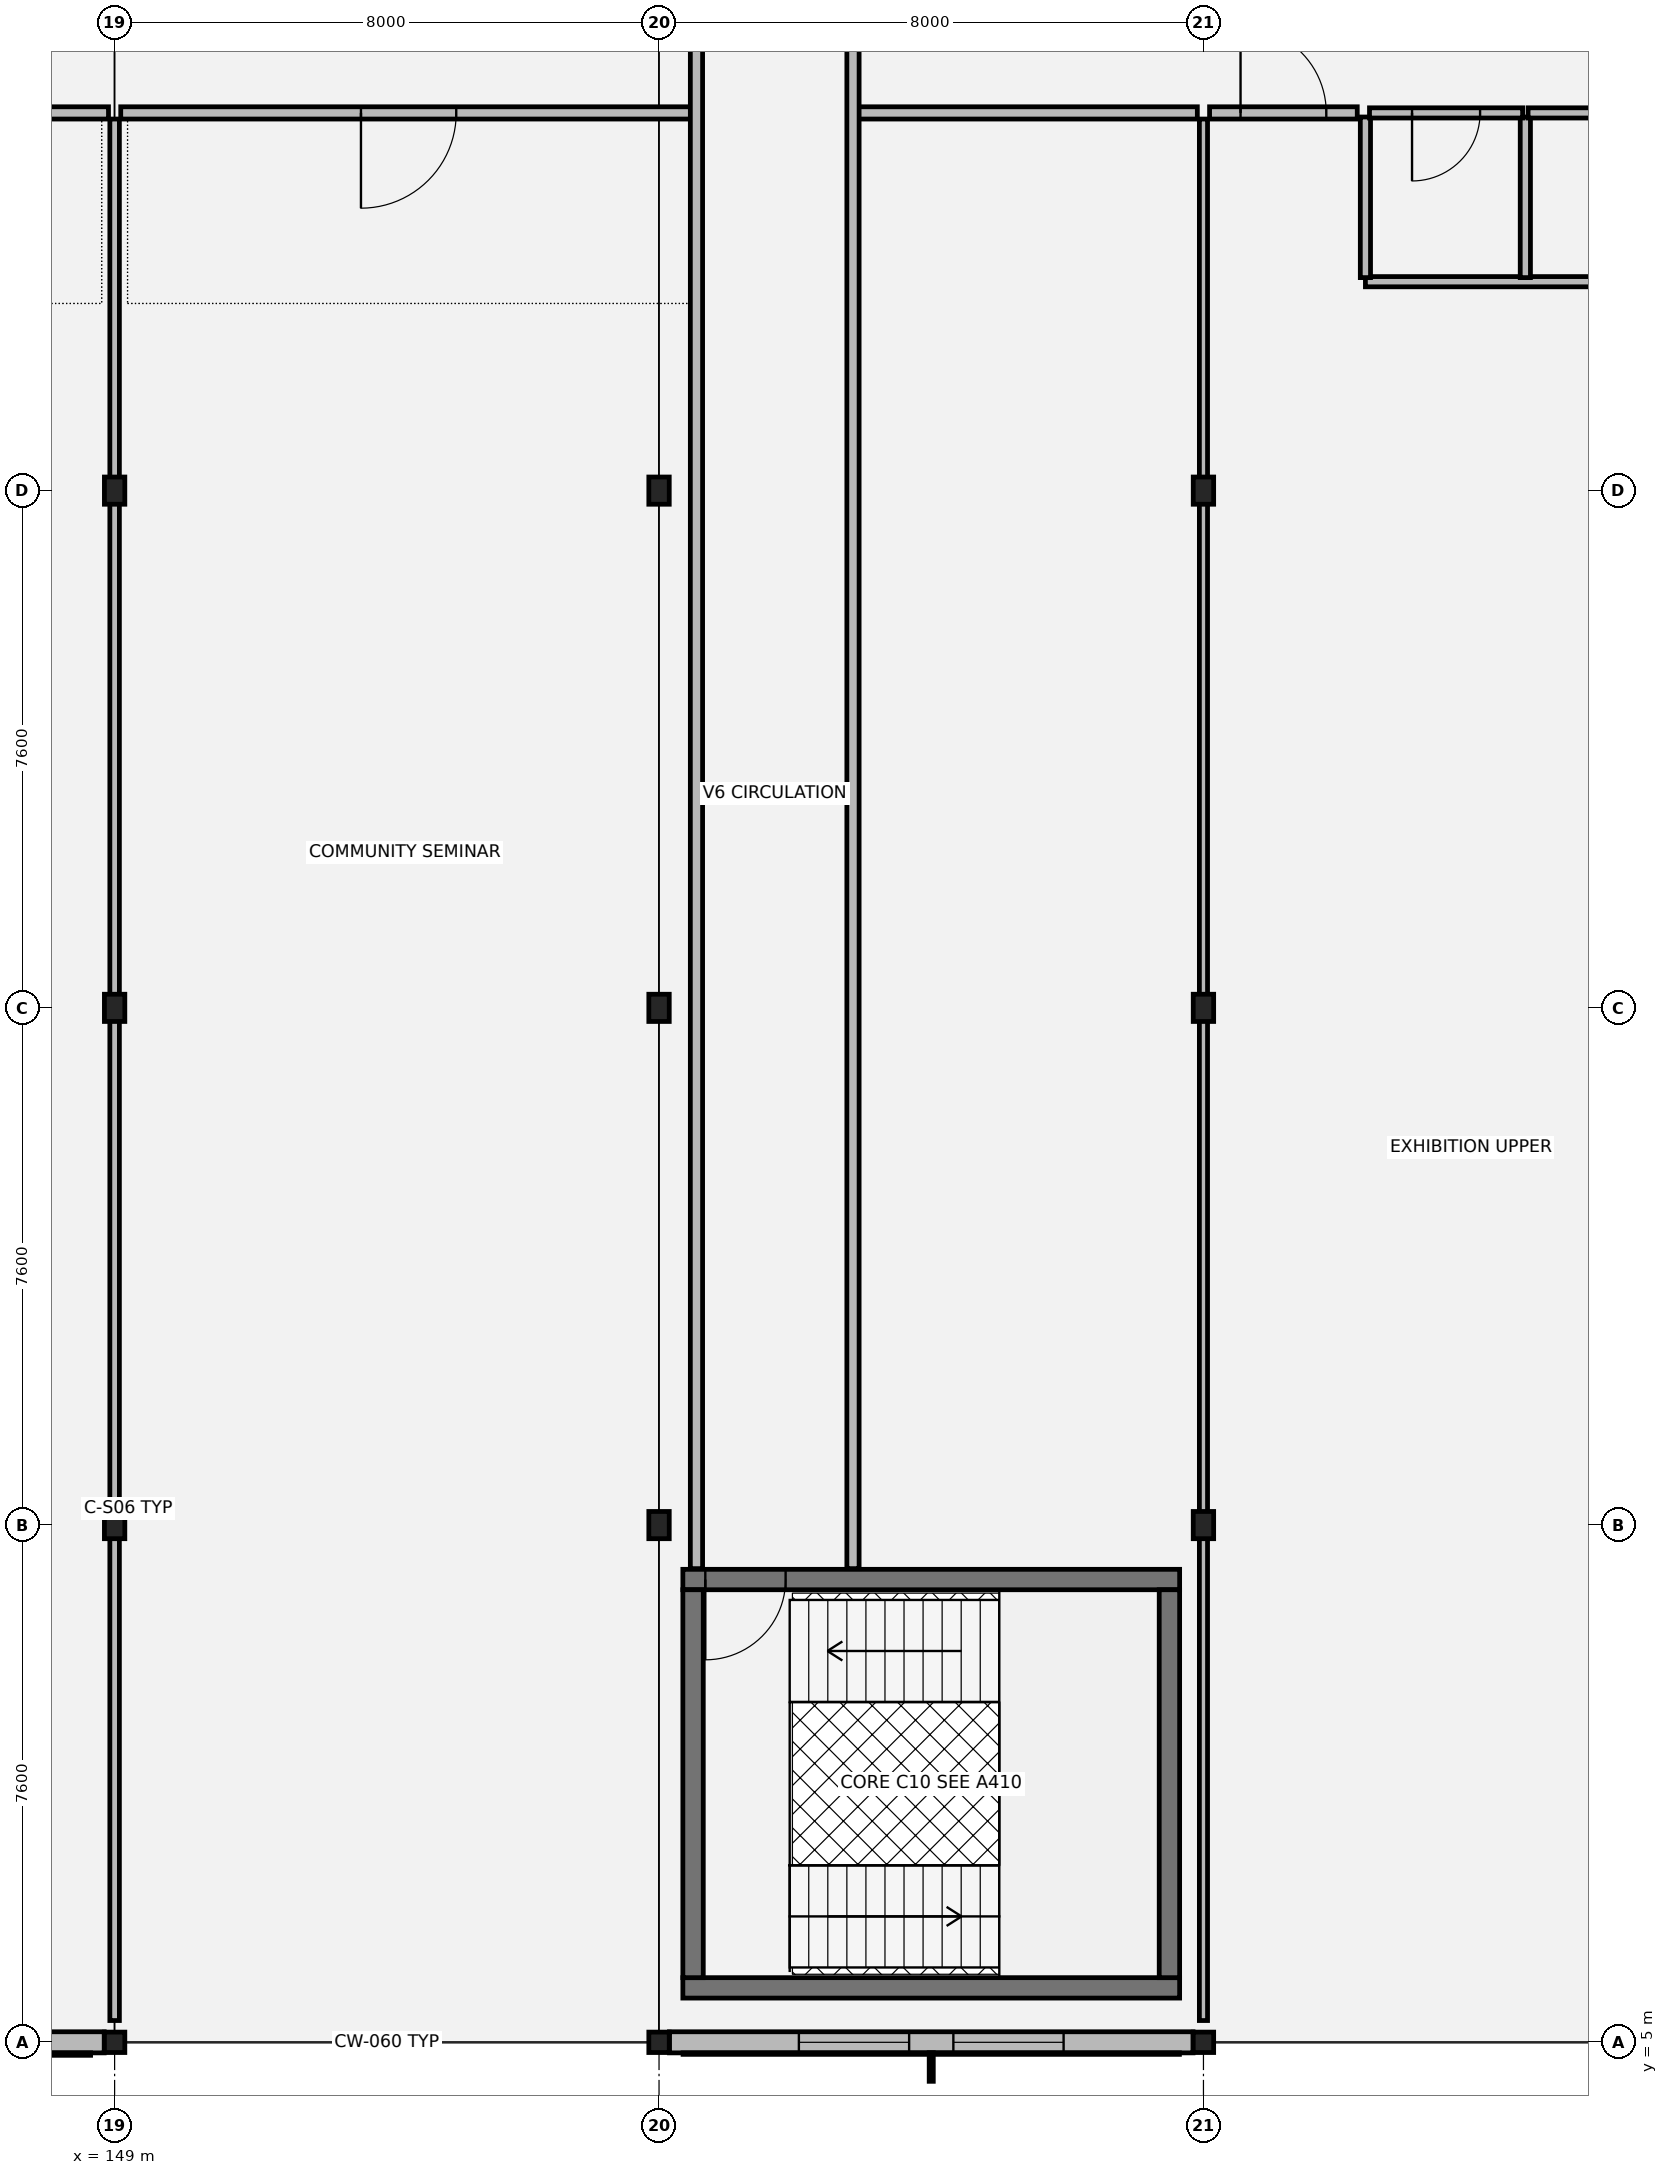
"""IFC4 building model, lengths in metres.
Left out: names, types, materials, properties, quantities, classifications, styles, units other than length and angle.
Written with IfcOpenShell. Run it as: python <this file> out.ifc"""

import sys

from ifc_helpers import new_model, si_unit, direction, frame, frame_2d, origin, origin_2d, place, context, subcontext, project, spatial, rectangle, hollow_rectangle, i_section, extrude, element, fill, save


model = new_model("IFC4")
c1 = context("Model", 3, precision=1e-05, world=origin(), true_north=direction((0.0, 1.0)))
c2 = subcontext(c1, "Body", "Model", "MODEL_VIEW")
j1 = project(units=[si_unit("LENGTHUNIT", "METRE"), si_unit("PLANEANGLEUNIT", "RADIAN")], contexts=[c1])
p1 = place(None, origin())
s1 = spatial("IfcSite", under=j1, at=p1, CompositionType="ELEMENT")
p2 = place(p1, origin())
s2 = spatial("IfcBuilding", under=s1, at=p2, CompositionType="ELEMENT")
p3 = place(p2, frame((0.0, 0.0, 5.1)))
s3 = spatial("IfcBuildingStorey", under=s2, at=p3, CompositionType="ELEMENT", Elevation=5.1)
p4 = place(p3, frame((149.0, 5.0, 0.0), z_axis=(0.0, 0.0, 1.0), x_axis=(1.0, 0.0, 0.0)))
e1 = element("IfcColumn", 1, at=p4, inside=s3, PredefinedType="COLUMN", context=c2, shape_type="SweptSolid", body=[
    extrude(hollow_rectangle(XDim=0.3, YDim=0.3, WallThickness=0.012, at=origin_2d()), origin(), (0.0, 0.0, 1.0), 4.055),
])
for number, where, z_axis, x_axis in (
    (2, (149.0, 12.6, 0.0), (0.0, 0.0, 1.0), (1.0, 0.0, 0.0)),
    (3, (149.0, 20.2, 0.0), (0.0, 0.0, 1.0), (1.0, 0.0, 0.0)),
    (4, (149.0, 27.8, 0.0), (0.0, 0.0, 1.0), (1.0, 0.0, 0.0)),
):
    element("IfcColumn", number, at=place(p3, frame(where, z_axis=z_axis, x_axis=x_axis)), inside=s3, PredefinedType="COLUMN", context=c2, shape_type="SweptSolid", body=[
        extrude(i_section(OverallWidth=0.3, OverallDepth=0.4, WebThickness=0.013, FlangeThickness=0.024, at=origin_2d()), origin(), (0.0, 0.0, 1.0), 4.055),
    ])
p5 = place(p3, frame((157.0, 5.0, 0.0), z_axis=(0.0, 0.0, 1.0), x_axis=(1.0, 0.0, 0.0)))
e5 = element("IfcColumn", 5, at=p5, inside=s3, PredefinedType="COLUMN", context=c2, shape_type="SweptSolid", body=[
    extrude(hollow_rectangle(XDim=0.3, YDim=0.3, WallThickness=0.012, at=origin_2d()), origin(), (0.0, 0.0, 1.0), 4.055),
])
for number, where, z_axis, x_axis in (
    (6, (157.0, 12.6, 0.0), (0.0, 0.0, 1.0), (1.0, 0.0, 0.0)),
    (7, (157.0, 20.2, 0.0), (0.0, 0.0, 1.0), (1.0, 0.0, 0.0)),
    (8, (157.0, 27.8, 0.0), (0.0, 0.0, 1.0), (1.0, 0.0, 0.0)),
):
    element("IfcColumn", number, at=place(p3, frame(where, z_axis=z_axis, x_axis=x_axis)), inside=s3, PredefinedType="COLUMN", context=c2, shape_type="SweptSolid", body=[
        extrude(i_section(OverallWidth=0.3, OverallDepth=0.4, WebThickness=0.013, FlangeThickness=0.024, at=origin_2d()), origin(), (0.0, 0.0, 1.0), 4.055),
    ])
p6 = place(p3, frame((165.0, 5.0, 0.0), z_axis=(0.0, 0.0, 1.0), x_axis=(1.0, 0.0, 0.0)))
e9 = element("IfcColumn", 9, at=p6, inside=s3, PredefinedType="COLUMN", context=c2, shape_type="SweptSolid", body=[
    extrude(hollow_rectangle(XDim=0.3, YDim=0.3, WallThickness=0.012, at=origin_2d()), origin(), (0.0, 0.0, 1.0), 4.055),
])
for number, where, z_axis, x_axis in (
    (10, (165.0, 12.6, 0.0), (0.0, 0.0, 1.0), (1.0, 0.0, 0.0)),
    (11, (165.0, 20.2, 0.0), (0.0, 0.0, 1.0), (1.0, 0.0, 0.0)),
    (12, (165.0, 27.8, 0.0), (0.0, 0.0, 1.0), (1.0, 0.0, 0.0)),
):
    element("IfcColumn", number, at=place(p3, frame(where, z_axis=z_axis, x_axis=x_axis)), inside=s3, PredefinedType="COLUMN", context=c2, shape_type="SweptSolid", body=[
        extrude(i_section(OverallWidth=0.3, OverallDepth=0.4, WebThickness=0.013, FlangeThickness=0.024, at=origin_2d()), origin(), (0.0, 0.0, 1.0), 4.055),
    ])
p7 = place(p3, frame((141.153, 5.0, 0.0), z_axis=(0.0, 0.0, 1.0), x_axis=(1.0, 0.0, 0.0)))
e13 = element("IfcWall", 13, at=p7, inside=s3, PredefinedType="SOLIDWALL", context=c2, shape_type="SweptSolid", body=[
    extrude(rectangle(XDim=7.694, YDim=0.31, at=frame_2d((3.847, 0.0))), origin(), (0.0, 0.0, 1.0), 3.48),
])
p8 = place(p7, frame((1.422, 0.0, 0.8)))
e14 = element("IfcOpeningElement", 14, at=p8, cuts=e13, PredefinedType="OPENING", context=c2, shape_type="SweptSolid", body=[
    extrude(rectangle(XDim=2.1, YDim=2.25, at=frame_2d((1.05, 1.125))), frame((0.0, 0.165, 0.0), z_axis=(0.0, -1.0, 0.0), x_axis=(1.0, 0.0, 0.0)), (0.0, 0.0, 1.0), 0.33),
])
p9 = place(p7, frame((4.172, 0.0, 0.8)))
e15 = element("IfcOpeningElement", 15, at=p9, cuts=e13, PredefinedType="OPENING", context=c2, shape_type="SweptSolid", body=[
    extrude(rectangle(XDim=2.1, YDim=2.25, at=frame_2d((1.05, 1.125))), frame((0.0, 0.165, 0.0), z_axis=(0.0, -1.0, 0.0), x_axis=(1.0, 0.0, 0.0)), (0.0, 0.0, 1.0), 0.33),
])
p10 = place(p3, frame((157.153, 5.0, 0.0), z_axis=(0.0, 0.0, 1.0), x_axis=(1.0, 0.0, 0.0)))
e16 = element("IfcWall", 16, at=p10, inside=s3, PredefinedType="SOLIDWALL", context=c2, shape_type="SweptSolid", body=[
    extrude(rectangle(XDim=7.694, YDim=0.31, at=frame_2d((3.847, 0.0))), origin(), (0.0, 0.0, 1.0), 3.48),
])
p11 = place(p10, frame((1.902, 0.0, 0.8)))
e17 = element("IfcOpeningElement", 17, at=p11, cuts=e16, PredefinedType="OPENING", context=c2, shape_type="SweptSolid", body=[
    extrude(rectangle(XDim=1.62, YDim=2.06, at=frame_2d((0.81, 1.03))), frame((0.0, 0.165, 0.0), z_axis=(0.0, -1.0, 0.0), x_axis=(1.0, 0.0, 0.0)), (0.0, 0.0, 1.0), 0.33),
])
p12 = place(p10, frame((4.172, 0.0, 0.8)))
e18 = element("IfcOpeningElement", 18, at=p12, cuts=e16, PredefinedType="OPENING", context=c2, shape_type="SweptSolid", body=[
    extrude(rectangle(XDim=1.62, YDim=2.06, at=frame_2d((0.81, 1.03))), frame((0.0, 0.165, 0.0), z_axis=(0.0, -1.0, 0.0), x_axis=(1.0, 0.0, 0.0)), (0.0, 0.0, 1.0), 0.33),
])
p13 = place(p3, frame((157.35, 5.8, 0.0), z_axis=(0.0, 0.0, 1.0), x_axis=(1.0, 0.0, 0.0)))
e19 = element("IfcWall", 19, at=p13, inside=s3, PredefinedType="SHEAR", context=c2, shape_type="SweptSolid", body=[
    extrude(rectangle(XDim=7.3, YDim=0.3, at=frame_2d((3.65, 0.0))), origin(), (0.0, 0.0, 1.0), 3.845),
])
p14 = place(p3, frame((157.35, 11.8, 0.0), z_axis=(0.0, 0.0, 1.0), x_axis=(1.0, 0.0, 0.0)))
e20 = element("IfcWall", 20, at=p14, inside=s3, PredefinedType="SHEAR", context=c2, shape_type="SweptSolid", body=[
    extrude(rectangle(XDim=7.3, YDim=0.3, at=frame_2d((3.65, 0.0))), origin(), (0.0, 0.0, 1.0), 3.845),
])
p15 = place(p14, frame((0.33, 0.0, 0.0)))
e21 = element("IfcOpeningElement", 21, at=p15, cuts=e20, PredefinedType="OPENING", context=c2, shape_type="SweptSolid", body=[
    extrude(rectangle(XDim=1.18, YDim=2.18, at=frame_2d((0.59, 1.09))), frame((0.0, 0.16, 0.0), z_axis=(0.0, -1.0, 0.0), x_axis=(1.0, 0.0, 0.0)), (0.0, 0.0, 1.0), 0.32),
])
for number, where, z_axis, x_axis in (
    (22, (157.5, 5.95, 0.0), (0.0, 0.0, 1.0), (0.0, 1.0, 0.0)),
    (23, (164.5, 5.95, 0.0), (0.0, 0.0, 1.0), (0.0, 1.0, 0.0)),
):
    element("IfcWall", number, at=place(p3, frame(where, z_axis=z_axis, x_axis=x_axis)), inside=s3, PredefinedType="SHEAR", context=c2, shape_type="SweptSolid", body=[
        extrude(rectangle(XDim=5.7, YDim=0.3, at=frame_2d((2.85, 0.0))), origin(), (0.0, 0.0, 1.0), 3.845),
    ])
p16 = place(p3, frame((167.38, 30.87, 0.0), z_axis=(0.0, 0.0, 1.0), x_axis=(1.0, 0.0, 0.0)))
e24 = element("IfcWall", 24, at=p16, inside=s3, PredefinedType="PARTITIONING", context=c2, shape_type="SweptSolid", body=[
    extrude(rectangle(XDim=5.42, YDim=0.15, at=frame_2d((2.71, 0.0))), origin(), (0.0, 0.0, 1.0), 3.18),
])
for number, where, z_axis, x_axis in (
    (25, (167.38, 30.93, 0.0), (0.0, 0.0, 1.0), (0.0, 1.0, 0.0)),
    (26, (169.73, 30.93, 0.0), (0.0, 0.0, 1.0), (0.0, 1.0, 0.0)),
):
    element("IfcWall", number, at=place(p3, frame(where, z_axis=z_axis, x_axis=x_axis)), inside=s3, PredefinedType="PARTITIONING", context=c2, shape_type="SweptSolid", body=[
        extrude(rectangle(XDim=2.36, YDim=0.15, at=frame_2d((1.18, 0.0))), origin(), (0.0, 0.0, 1.0), 3.18),
    ])
p17 = place(p3, frame((167.44, 33.35, 0.0), z_axis=(0.0, 0.0, 1.0), x_axis=(1.0, 0.0, 0.0)))
e27 = element("IfcWall", 27, at=p17, inside=s3, PredefinedType="PARTITIONING", context=c2, shape_type="SweptSolid", body=[
    extrude(rectangle(XDim=2.25, YDim=0.15, at=frame_2d((1.125, 0.0))), origin(), (0.0, 0.0, 1.0), 3.18),
])
p18 = place(p17, frame((0.625, 0.0, 0.0)))
e28 = element("IfcOpeningElement", 28, at=p18, cuts=e27, PredefinedType="OPENING", context=c2, shape_type="SweptSolid", body=[
    extrude(rectangle(XDim=1.0, YDim=2.15, at=frame_2d((0.5, 1.075))), frame((0.0, 0.085, 0.0), z_axis=(0.0, -1.0, 0.0), x_axis=(1.0, 0.0, 0.0)), (0.0, 0.0, 1.0), 0.17),
])
p19 = place(p3, frame((169.77, 33.35, 0.0), z_axis=(0.0, 0.0, 1.0), x_axis=(1.0, 0.0, 0.0)))
e29 = element("IfcWall", 29, at=p19, inside=s3, PredefinedType="PARTITIONING", context=c2, shape_type="SweptSolid", body=[
    extrude(rectangle(XDim=3.03, YDim=0.15, at=frame_2d((1.515, 0.0))), origin(), (0.0, 0.0, 1.0), 3.18),
])
p20 = place(p19, frame((1.78, 0.0, 0.0)))
e30 = element("IfcOpeningElement", 30, at=p20, cuts=e29, PredefinedType="OPENING", context=c2, shape_type="SweptSolid", body=[
    extrude(rectangle(XDim=0.9, YDim=2.15, at=frame_2d((0.45, 1.075))), frame((0.0, 0.085, 0.0), z_axis=(0.0, -1.0, 0.0), x_axis=(1.0, 0.0, 0.0)), (0.0, 0.0, 1.0), 0.17),
])
p21 = place(p3, frame((141.2, 33.35, 0.0), z_axis=(0.0, 0.0, 1.0), x_axis=(1.0, 0.0, 0.0)))
e31 = element("IfcWall", 31, at=p21, inside=s3, PredefinedType="PARTITIONING", context=c2, shape_type="SweptSolid", body=[
    extrude(rectangle(XDim=7.71, YDim=0.18, at=frame_2d((3.855, 0.0))), origin(), (0.0, 0.0, 1.0), 3.18),
])
p22 = place(p21, frame((2.955, 0.0, 0.0)))
e32 = element("IfcOpeningElement", 32, at=p22, cuts=e31, PredefinedType="OPENING", context=c2, shape_type="SweptSolid", body=[
    extrude(rectangle(XDim=1.8, YDim=2.3, at=frame_2d((0.9, 1.15))), frame((0.0, 0.1, 0.0), z_axis=(0.0, -1.0, 0.0), x_axis=(1.0, 0.0, 0.0)), (0.0, 0.0, 1.0), 0.2),
])
p23 = place(p3, frame((149.09, 33.35, 0.0), z_axis=(0.0, 0.0, 1.0), x_axis=(1.0, 0.0, 0.0)))
e33 = element("IfcWall", 33, at=p23, inside=s3, PredefinedType="PARTITIONING", context=c2, shape_type="SweptSolid", body=[
    extrude(rectangle(XDim=8.46, YDim=0.18, at=frame_2d((4.23, 0.0))), origin(), (0.0, 0.0, 1.0), 3.18),
])
p24 = place(p23, frame((3.53, 0.0, 0.0)))
e34 = element("IfcOpeningElement", 34, at=p24, cuts=e33, PredefinedType="OPENING", context=c2, shape_type="SweptSolid", body=[
    extrude(rectangle(XDim=1.4, YDim=2.22, at=frame_2d((0.7, 1.11))), frame((0.0, 0.1, 0.0), z_axis=(0.0, -1.0, 0.0), x_axis=(1.0, 0.0, 0.0)), (0.0, 0.0, 1.0), 0.2),
])
p25 = place(p3, frame((159.85, 33.35, 0.0), z_axis=(0.0, 0.0, 1.0), x_axis=(1.0, 0.0, 0.0)))
e35 = element("IfcWall", 35, at=p25, inside=s3, PredefinedType="PARTITIONING", context=c2, shape_type="SweptSolid", body=[
    extrude(rectangle(XDim=5.06, YDim=0.18, at=frame_2d((2.53, 0.0))), origin(), (0.0, 0.0, 1.0), 3.18),
])
p26 = place(p3, frame((165.09, 33.35, 0.0), z_axis=(0.0, 0.0, 1.0), x_axis=(1.0, 0.0, 0.0)))
e36 = element("IfcWall", 36, at=p26, inside=s3, PredefinedType="PARTITIONING", context=c2, shape_type="SweptSolid", body=[
    extrude(rectangle(XDim=2.17, YDim=0.18, at=frame_2d((1.085, 0.0))), origin(), (0.0, 0.0, 1.0), 3.18),
])
p27 = place(p26, frame((0.455, 0.0, 0.0)))
e37 = element("IfcOpeningElement", 37, at=p27, cuts=e36, PredefinedType="OPENING", context=c2, shape_type="SweptSolid", body=[
    extrude(rectangle(XDim=1.26, YDim=2.2, at=frame_2d((0.63, 1.1))), frame((0.0, 0.1, 0.0), z_axis=(0.0, -1.0, 0.0), x_axis=(1.0, 0.0, 0.0)), (0.0, 0.0, 1.0), 0.2),
])
for number, where, z_axis, x_axis in (
    (38, (157.55, 11.96, 0.0), (0.0, 0.0, 1.0), (0.0, 1.0, 0.0)),
    (39, (159.85, 11.96, 0.0), (0.0, 0.0, 1.0), (0.0, 1.0, 0.0)),
):
    element("IfcWall", number, at=place(p3, frame(where, z_axis=z_axis, x_axis=x_axis)), inside=s3, PredefinedType="PARTITIONING", context=c2, shape_type="SweptSolid", body=[
        extrude(rectangle(XDim=24.08, YDim=0.18, at=frame_2d((12.04, 0.0))), origin(), (0.0, 0.0, 1.0), 3.18),
    ])
p28 = place(p3, frame((149.0, 5.32, 0.0), z_axis=(0.0, 0.0, 1.0), x_axis=(0.0, 1.0, 0.0)))
e40 = element("IfcWall", 40, at=p28, inside=s3, PredefinedType="PARTITIONING", context=c2, shape_type="SweptSolid", body=[
    extrude(rectangle(XDim=27.94, YDim=0.14, at=frame_2d((13.97, 0.0))), origin(), (0.0, 0.0, 1.0), 3.18),
])
p29 = place(p3, frame((165.0, 5.32, 0.0), z_axis=(0.0, 0.0, 1.0), x_axis=(0.0, 1.0, 0.0)))
e41 = element("IfcWall", 41, at=p29, inside=s3, PredefinedType="PARTITIONING", context=c2, shape_type="SweptSolid", body=[
    extrude(rectangle(XDim=27.94, YDim=0.12, at=frame_2d((13.97, 0.0))), origin(), (0.0, 0.0, 1.0), 3.18),
])
p30 = place(p11, origin())
e42 = element("IfcWindow", 42, at=p30, inside=s3, PartitioningType="SINGLE_PANEL", PredefinedType="WINDOW", context=c2, shape_type="SweptSolid", body=[
    extrude(rectangle(XDim=1.62, YDim=2.06, at=frame_2d((0.81, 1.03))), frame((0.0, 0.03, 0.0), z_axis=(0.0, -1.0, 0.0), x_axis=(1.0, 0.0, 0.0)), (0.0, 0.0, 1.0), 0.06),
])
fill(e17, e42)
p31 = place(p12, origin())
e43 = element("IfcWindow", 43, at=p31, inside=s3, PartitioningType="SINGLE_PANEL", PredefinedType="WINDOW", context=c2, shape_type="SweptSolid", body=[
    extrude(rectangle(XDim=1.62, YDim=2.06, at=frame_2d((0.81, 1.03))), frame((0.0, 0.03, 0.0), z_axis=(0.0, -1.0, 0.0), x_axis=(1.0, 0.0, 0.0)), (0.0, 0.0, 1.0), 0.06),
])
fill(e18, e43)
p32 = place(p15, origin())
e44 = element("IfcDoor", 44, at=p32, inside=s3, OperationType="SINGLE_SWING_RIGHT", PredefinedType="DOOR", context=c2, shape_type="SweptSolid", body=[
    extrude(rectangle(XDim=1.18, YDim=2.18, at=frame_2d((0.59, 1.09))), frame((0.0, 0.025, 0.0), z_axis=(0.0, -1.0, 0.0), x_axis=(1.0, 0.0, 0.0)), (0.0, 0.0, 1.0), 0.05),
])
fill(e21, e44)
p33 = place(p18, origin())
e45 = element("IfcDoor", 45, at=p33, inside=s3, OperationType="SINGLE_SWING_RIGHT", PredefinedType="DOOR", context=c2, shape_type="SweptSolid", body=[
    extrude(rectangle(XDim=1.0, YDim=2.15, at=frame_2d((0.5, 1.075))), frame((0.0, 0.025, 0.0), z_axis=(0.0, -1.0, 0.0), x_axis=(1.0, 0.0, 0.0)), (0.0, 0.0, 1.0), 0.05),
])
fill(e28, e45)
p34 = place(p24, origin())
e46 = element("IfcDoor", 46, at=p34, inside=s3, OperationType="SINGLE_SWING_RIGHT", PredefinedType="DOOR", context=c2, shape_type="SweptSolid", body=[
    extrude(rectangle(XDim=1.4, YDim=2.22, at=frame_2d((0.7, 1.11))), frame((0.0, 0.025, 0.0), z_axis=(0.0, -1.0, 0.0), x_axis=(1.0, 0.0, 0.0)), (0.0, 0.0, 1.0), 0.05),
])
fill(e34, e46)
p35 = place(p27, origin())
e47 = element("IfcDoor", 47, at=p35, inside=s3, OperationType="SINGLE_SWING_LEFT", PredefinedType="DOOR", context=c2, shape_type="SweptSolid", body=[
    extrude(rectangle(XDim=1.26, YDim=2.2, at=frame_2d((0.63, 1.1))), frame((0.0, 0.025, 0.0), z_axis=(0.0, -1.0, 0.0), x_axis=(1.0, 0.0, 0.0)), (0.0, 0.0, 1.0), 0.05),
])
fill(e37, e47)
save(model, sys.argv[1])
